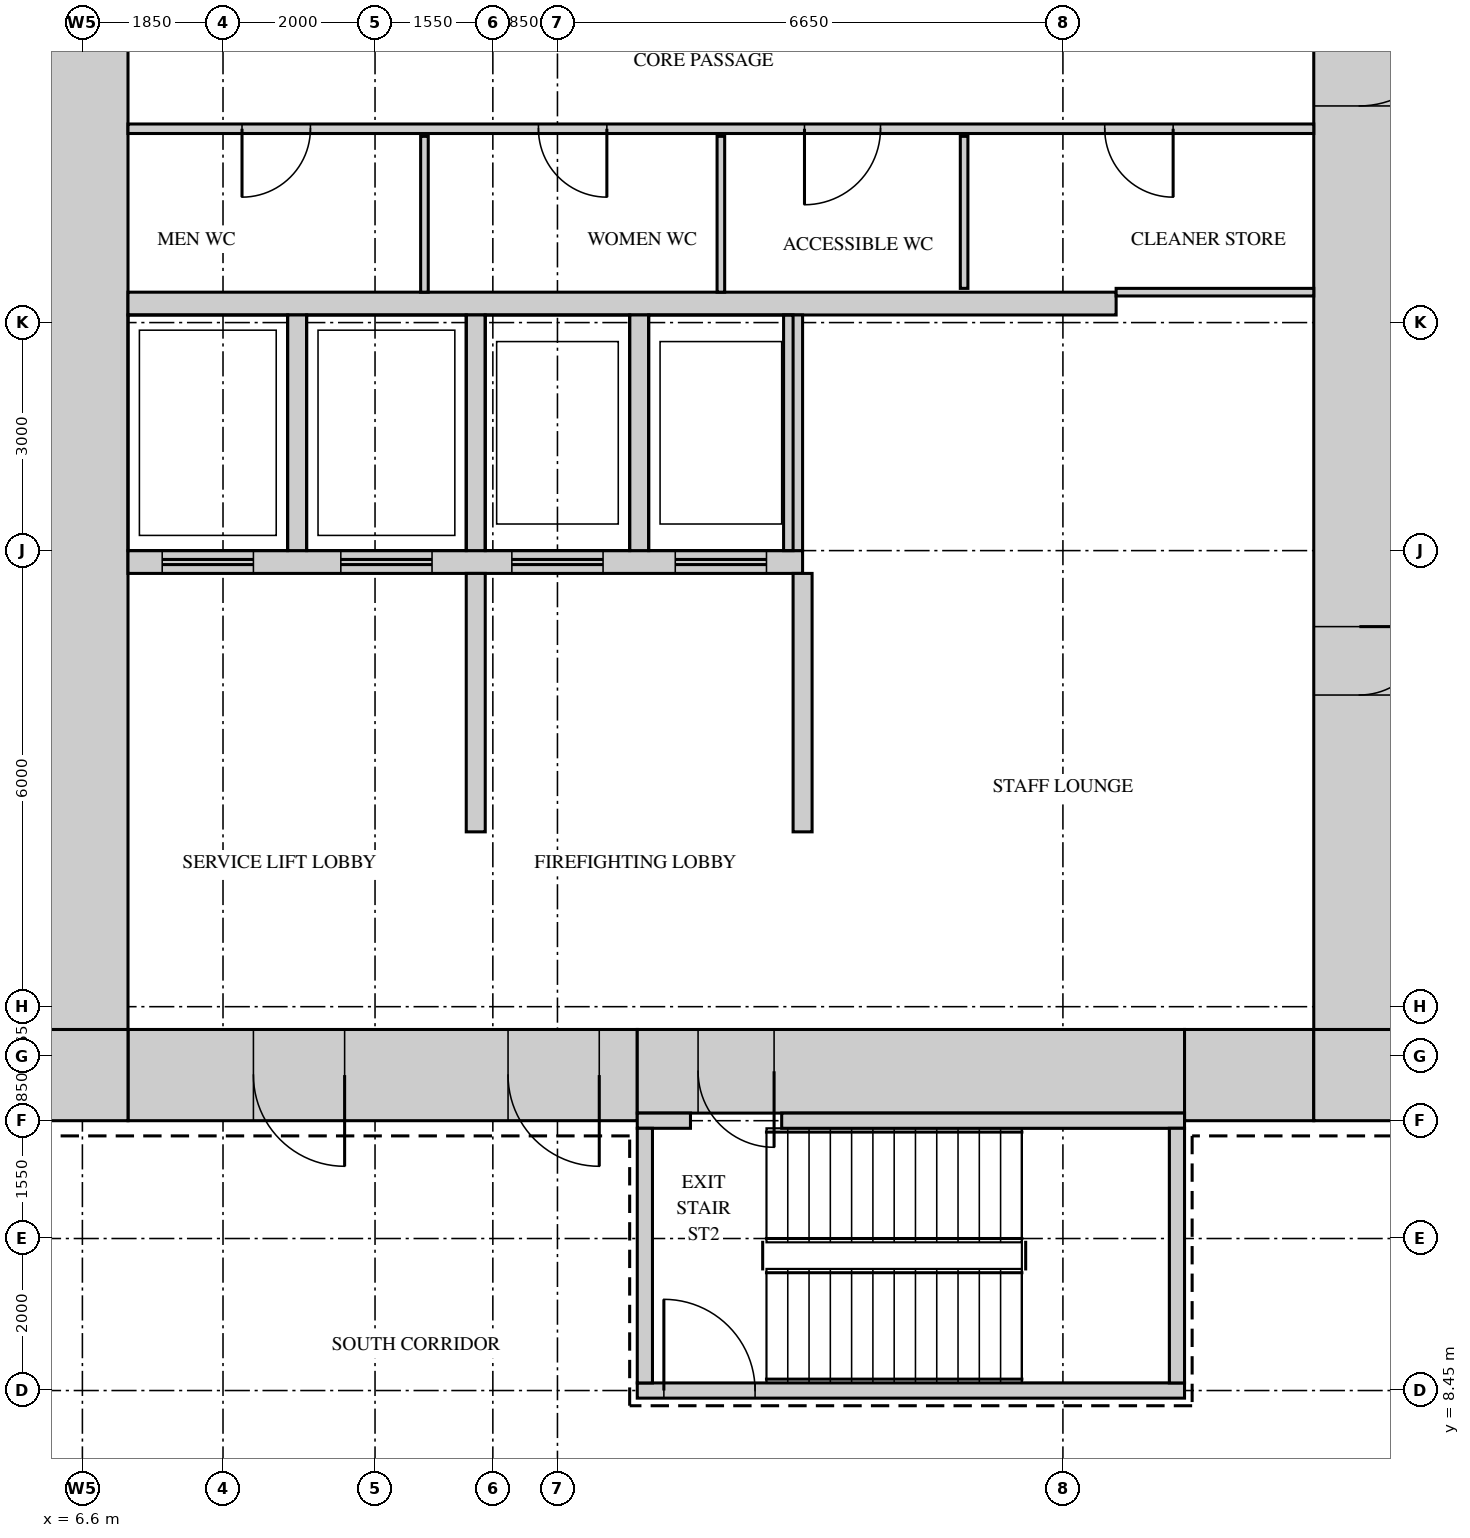
"""IFC4 building model, lengths in metres.
Left out: names, types, materials, properties, quantities, classifications, styles, units other than length and angle.
Written with IfcOpenShell. Run it as: python <this file> out.ifc"""

import sys

from ifc_helpers import new_model, si_unit, direction, frame, frame_2d, origin, place, context, subcontext, project, spatial, rectangle, extrude, source, transform, mapped, element, fill, save


model = new_model("IFC4")
c1 = context("Model", 3, precision=1e-05, world=origin(), true_north=direction((0.0, 1.0)))
c2 = subcontext(c1, "Body", "Model", "MODEL_VIEW")
j1 = project(units=[si_unit("LENGTHUNIT", "METRE"), si_unit("PLANEANGLEUNIT", "RADIAN")], contexts=[c1])
p1 = place(None, origin())
s1 = spatial("IfcSite", under=j1, at=p1, CompositionType="ELEMENT")
p2 = place(p1, origin())
s2 = spatial("IfcBuilding", under=s1, at=p2, CompositionType="ELEMENT")
p3 = place(p2, frame((0.0, 0.0, 69.0)))
s3 = spatial("IfcBuildingStorey", under=s2, at=p3, CompositionType="ELEMENT", Elevation=69.0)
m1 = source(origin(), c2, "Body", "SweptSolid", [
    extrude(rectangle(XDim=6.7, YDim=1.2, at=frame_2d((3.35, 0.0))), origin(), (0.0, 0.0, 1.0), 4.2),
])
p4 = place(p3, frame((7.2, 12.6, 0.0), z_axis=(0.0, 0.0, 1.0), x_axis=(1.0, 0.0, 0.0)))
e1 = element("IfcWall", 1, at=p4, inside=s3, PredefinedType="SHEAR", context=c2, shape_type="MappedRepresentation", body=[
    mapped(m1, transform((0.0, 0.0, 0.0))),
])
m2 = source(origin(), c2, "Body", "SweptSolid", [
    extrude(rectangle(XDim=1.2, YDim=2.1, at=frame_2d((0.6, 1.05))), frame((0.0, 0.61, 0.0), z_axis=(0.0, -1.0, 0.0), x_axis=(1.0, 0.0, 0.0)), (0.0, 0.0, 1.0), 1.22),
])
p5 = place(p4, frame((5.0, 0.0, 0.0)))
e2 = element("IfcOpeningElement", 2, at=p5, cuts=e1, PredefinedType="OPENING", context=c2, shape_type="MappedRepresentation", body=[
    mapped(m2, transform((0.0, 0.0, 0.0))),
])
p6 = place(p4, frame((1.65, 0.0, 0.0)))
e3 = element("IfcOpeningElement", 3, at=p6, cuts=e1, PredefinedType="OPENING", context=c2, shape_type="MappedRepresentation", body=[
    mapped(m2, transform((0.0, 0.0, 0.0))),
])
m3 = source(origin(), c2, "Body", "SweptSolid", [
    extrude(rectangle(XDim=7.2, YDim=1.1, at=frame_2d((3.6, 0.0))), origin(), (0.0, 0.0, 1.0), 4.2),
])
p7 = place(p3, frame((13.9, 12.65, 0.0), z_axis=(0.0, 0.0, 1.0), x_axis=(1.0, 0.0, 0.0)))
e4 = element("IfcWall", 4, at=p7, inside=s3, PredefinedType="SHEAR", context=c2, shape_type="MappedRepresentation", body=[
    mapped(m3, transform((0.0, 0.0, 0.0))),
])
m4 = source(origin(), c2, "Body", "SweptSolid", [
    extrude(rectangle(XDim=1.0, YDim=2.1, at=frame_2d((0.5, 1.05))), frame((0.0, 0.56, 0.0), z_axis=(0.0, -1.0, 0.0), x_axis=(1.0, 0.0, 0.0)), (0.0, 0.0, 1.0), 1.12),
])
p8 = place(p7, frame((0.8, 0.0, 0.0)))
e5 = element("IfcOpeningElement", 5, at=p8, cuts=e4, PredefinedType="OPENING", context=c2, shape_type="MappedRepresentation", body=[
    mapped(m4, transform((0.0, 0.0, 0.0))),
])
m5 = source(origin(), c2, "Body", "SweptSolid", [
    extrude(rectangle(XDim=1.7, YDim=1.2, at=frame_2d((0.85, 0.0))), origin(), (0.0, 0.0, 1.0), 4.2),
])
p9 = place(p3, frame((21.1, 12.6, 0.0), z_axis=(0.0, 0.0, 1.0), x_axis=(1.0, 0.0, 0.0)))
e6 = element("IfcWall", 6, at=p9, inside=s3, PredefinedType="SHEAR", context=c2, shape_type="MappedRepresentation", body=[
    mapped(m5, transform((0.0, 0.0, 0.0))),
])
m6 = source(origin(), c2, "Body", "SweptSolid", [
    extrude(rectangle(XDim=1.2, YDim=1.2, at=frame_2d((0.6, 0.0))), origin(), (0.0, 0.0, 1.0), 4.2),
])
for number, where, z_axis, x_axis in (
    (7, (22.8, 12.6, 0.0), (0.0, 0.0, 1.0), (1.0, 0.0, 0.0)),
    (8, (6.0, 12.6, 0.0), (0.0, 0.0, 1.0), (1.0, 0.0, 0.0)),
):
    element("IfcWall", number, at=place(p3, frame(where, z_axis=z_axis, x_axis=x_axis)), inside=s3, PredefinedType="SHEAR", context=c2, shape_type="MappedRepresentation", body=[
        mapped(m6, transform((0.0, 0.0, 0.0))),
    ])
m7 = source(origin(), c2, "Body", "SweptSolid", [
    extrude(rectangle(XDim=27.6, YDim=1.2, at=frame_2d((13.8, 0.0))), origin(), (0.0, 0.0, 1.0), 4.2),
])
p10 = place(p3, frame((23.4, 13.2, 0.0), z_axis=(0.0, 0.0, 1.0), x_axis=(0.0, 1.0, 0.0)))
e9 = element("IfcWall", 9, at=p10, inside=s3, PredefinedType="SHEAR", context=c2, shape_type="MappedRepresentation", body=[
    mapped(m7, transform((0.0, 0.0, 0.0))),
])
m8 = source(origin(), c2, "Body", "SweptSolid", [
    extrude(rectangle(XDim=1.8, YDim=2.1, at=frame_2d((0.9, 1.05))), frame((0.0, 0.61, 0.0), z_axis=(0.0, -1.0, 0.0), x_axis=(1.0, 0.0, 0.0)), (0.0, 0.0, 1.0), 1.22),
])
p11 = place(p10, frame((22.4, 0.0, 0.0)))
e10 = element("IfcOpeningElement", 10, at=p11, cuts=e9, PredefinedType="OPENING", context=c2, shape_type="MappedRepresentation", body=[
    mapped(m8, transform((0.0, 0.0, 0.0))),
])
p12 = place(p10, frame((12.15, 0.0, 0.0)))
e11 = element("IfcOpeningElement", 11, at=p12, cuts=e9, PredefinedType="OPENING", context=c2, shape_type="MappedRepresentation", body=[
    mapped(m2, transform((0.0, 0.0, 0.0))),
])
m9 = source(origin(), c2, "Body", "SweptSolid", [
    extrude(rectangle(XDim=0.9, YDim=2.1, at=frame_2d((0.45, 1.05))), frame((0.0, 0.61, 0.0), z_axis=(0.0, -1.0, 0.0), x_axis=(1.0, 0.0, 0.0)), (0.0, 0.0, 1.0), 1.22),
])
p13 = place(p10, frame((4.4, 0.0, 0.0)))
e12 = element("IfcOpeningElement", 12, at=p13, cuts=e9, PredefinedType="OPENING", context=c2, shape_type="MappedRepresentation", body=[
    mapped(m9, transform((0.0, 0.0, 0.0))),
])
p14 = place(p3, frame((6.6, 13.2, 0.0), z_axis=(0.0, 0.0, 1.0), x_axis=(0.0, 1.0, 0.0)))
e13 = element("IfcWall", 13, at=p14, inside=s3, PredefinedType="SHEAR", context=c2, shape_type="MappedRepresentation", body=[
    mapped(m7, transform((0.0, 0.0, 0.0))),
])
m10 = source(origin(), c2, "Body", "SweptSolid", [
    extrude(rectangle(XDim=0.7, YDim=0.2, at=frame_2d((0.35, 0.0))), origin(), (0.0, 0.0, 1.0), 4.2),
])
p15 = place(p3, frame((13.9, 12.0, 0.0), z_axis=(0.0, 0.0, 1.0), x_axis=(1.0, 0.0, 0.0)))
e14 = element("IfcWall", 14, at=p15, inside=s3, PredefinedType="SHEAR", context=c2, shape_type="MappedRepresentation", body=[
    mapped(m10, transform((0.0, 0.0, 0.0))),
])
m11 = source(origin(), c2, "Body", "SweptSolid", [
    extrude(rectangle(XDim=5.3, YDim=0.2, at=frame_2d((2.65, 0.0))), origin(), (0.0, 0.0, 1.0), 4.2),
])
p16 = place(p3, frame((15.8, 12.0, 0.0), z_axis=(0.0, 0.0, 1.0), x_axis=(1.0, 0.0, 0.0)))
e15 = element("IfcWall", 15, at=p16, inside=s3, PredefinedType="SHEAR", context=c2, shape_type="MappedRepresentation", body=[
    mapped(m11, transform((0.0, 0.0, 0.0))),
])
m12 = source(origin(), c2, "Body", "SweptSolid", [
    extrude(rectangle(XDim=7.2, YDim=0.2, at=frame_2d((3.6, 0.0))), origin(), (0.0, 0.0, 1.0), 4.2),
])
p17 = place(p3, frame((13.9, 8.45, 0.0), z_axis=(0.0, 0.0, 1.0), x_axis=(1.0, 0.0, 0.0)))
e16 = element("IfcWall", 16, at=p17, inside=s3, PredefinedType="SHEAR", context=c2, shape_type="MappedRepresentation", body=[
    mapped(m12, transform((0.0, 0.0, 0.0))),
])
m13 = source(origin(), c2, "Body", "SweptSolid", [
    extrude(rectangle(XDim=1.2, YDim=2.1, at=frame_2d((0.6, 1.05))), frame((0.0, 0.11, 0.0), z_axis=(0.0, -1.0, 0.0), x_axis=(1.0, 0.0, 0.0)), (0.0, 0.0, 1.0), 0.22),
])
p18 = place(p17, frame((0.35, 0.0, 0.0)))
e17 = element("IfcOpeningElement", 17, at=p18, cuts=e16, PredefinedType="OPENING", context=c2, shape_type="MappedRepresentation", body=[
    mapped(m13, transform((0.0, 0.0, 0.0))),
])
m14 = source(origin(), c2, "Body", "SweptSolid", [
    extrude(rectangle(XDim=3.35, YDim=0.2, at=frame_2d((1.675, 0.0))), origin(), (0.0, 0.0, 1.0), 4.2),
])
for number, where, z_axis, x_axis in (
    (18, (21.0, 8.55, 0.0), (0.0, 0.0, 1.0), (0.0, 1.0, 0.0)),
    (19, (14.0, 8.55, 0.0), (0.0, 0.0, 1.0), (0.0, 1.0, 0.0)),
):
    element("IfcWall", number, at=place(p3, frame(where, z_axis=z_axis, x_axis=x_axis)), inside=s3, PredefinedType="SHEAR", context=c2, shape_type="MappedRepresentation", body=[
        mapped(m14, transform((0.0, 0.0, 0.0))),
    ])
m15 = source(origin(), c2, "Body", "SweptSolid", [
    extrude(rectangle(XDim=13.0, YDim=0.3, at=frame_2d((6.5, 0.0))), origin(), (0.0, 0.0, 1.0), 4.2),
])
p19 = place(p3, frame((7.2, 22.75, 0.0), z_axis=(0.0, 0.0, 1.0), x_axis=(1.0, 0.0, 0.0)))
e20 = element("IfcWall", 20, at=p19, inside=s3, PredefinedType="STANDARD", context=c2, shape_type="MappedRepresentation", body=[
    mapped(m15, transform((0.0, 0.0, 0.0))),
])
m16 = source(origin(), c2, "Body", "SweptSolid", [
    extrude(rectangle(XDim=8.875, YDim=0.3, at=frame_2d((4.438, 0.0))), origin(), (0.0, 0.0, 1.0), 4.2),
])
p20 = place(p3, frame((7.2, 19.35, 0.0), z_axis=(0.0, 0.0, 1.0), x_axis=(1.0, 0.0, 0.0)))
e21 = element("IfcWall", 21, at=p20, inside=s3, PredefinedType="STANDARD", context=c2, shape_type="MappedRepresentation", body=[
    mapped(m16, transform((0.0, 0.0, 0.0))),
])
m17 = source(origin(), c2, "Body", "SweptSolid", [
    extrude(rectangle(XDim=1.2, YDim=2.1, at=frame_2d((0.6, 1.05))), frame((0.0, 0.16, 0.0), z_axis=(0.0, -1.0, 0.0), x_axis=(1.0, 0.0, 0.0)), (0.0, 0.0, 1.0), 0.32),
])
p21 = place(p20, frame((0.45, 0.0, 0.0)))
e22 = element("IfcOpeningElement", 22, at=p21, cuts=e21, PredefinedType="OPENING", context=c2, shape_type="MappedRepresentation", body=[
    mapped(m17, transform((0.0, 0.0, 0.0))),
])
p22 = place(p20, frame((2.8, 0.0, 0.0)))
e23 = element("IfcOpeningElement", 23, at=p22, cuts=e21, PredefinedType="OPENING", context=c2, shape_type="MappedRepresentation", body=[
    mapped(m17, transform((0.0, 0.0, 0.0))),
])
p23 = place(p20, frame((5.05, 0.0, 0.0)))
e24 = element("IfcOpeningElement", 24, at=p23, cuts=e21, PredefinedType="OPENING", context=c2, shape_type="MappedRepresentation", body=[
    mapped(m17, transform((0.0, 0.0, 0.0))),
])
p24 = place(p20, frame((7.2, 0.0, 0.0)))
e25 = element("IfcOpeningElement", 25, at=p24, cuts=e21, PredefinedType="OPENING", context=c2, shape_type="MappedRepresentation", body=[
    mapped(m17, transform((0.0, 0.0, 0.0))),
])
m18 = source(origin(), c2, "Body", "SweptSolid", [
    extrude(rectangle(XDim=3.1, YDim=0.25, at=frame_2d((1.55, 0.0))), origin(), (0.0, 0.0, 1.0), 4.2),
])
for number, where, z_axis, x_axis in (
    (26, (9.425, 19.5, 0.0), (0.0, 0.0, 1.0), (0.0, 1.0, 0.0)),
    (27, (11.775, 19.5, 0.0), (0.0, 0.0, 1.0), (0.0, 1.0, 0.0)),
    (28, (13.925, 19.5, 0.0), (0.0, 0.0, 1.0), (0.0, 1.0, 0.0)),
    (29, (15.95, 19.5, 0.0), (0.0, 0.0, 1.0), (0.0, 1.0, 0.0)),
):
    element("IfcWall", number, at=place(p3, frame(where, z_axis=z_axis, x_axis=x_axis)), inside=s3, PredefinedType="STANDARD", context=c2, shape_type="MappedRepresentation", body=[
        mapped(m18, transform((0.0, 0.0, 0.0))),
    ])
m19 = source(origin(), c2, "Body", "SweptSolid", [
    extrude(rectangle(XDim=3.4, YDim=0.25, at=frame_2d((1.7, 0.0))), origin(), (0.0, 0.0, 1.0), 4.2),
])
for number, where, z_axis, x_axis in (
    (30, (16.075, 15.8, 0.0), (0.0, 0.0, 1.0), (0.0, 1.0, 0.0)),
    (31, (11.775, 15.8, 0.0), (0.0, 0.0, 1.0), (0.0, 1.0, 0.0)),
):
    element("IfcWall", number, at=place(p3, frame(where, z_axis=z_axis, x_axis=x_axis)), inside=s3, PredefinedType="STANDARD", context=c2, shape_type="MappedRepresentation", body=[
        mapped(m19, transform((0.0, 0.0, 0.0))),
    ])
m20 = source(origin(), c2, "Body", "SweptSolid", [
    extrude(rectangle(XDim=2.05, YDim=0.1, at=frame_2d((1.025, 0.0))), origin(), (0.0, 0.0, 1.0), 4.3),
])
for number, where, z_axis, x_axis in (
    (32, (11.1, 22.9, 0.0), (0.0, 0.0, 1.0), (0.0, 1.0, 0.0)),
    (33, (15.0, 22.9, 0.0), (0.0, 0.0, 1.0), (0.0, 1.0, 0.0)),
):
    element("IfcWall", number, at=place(p3, frame(where, z_axis=z_axis, x_axis=x_axis)), inside=s3, PredefinedType="PARTITIONING", context=c2, shape_type="MappedRepresentation", body=[
        mapped(m20, transform((0.0, 0.0, 0.0))),
    ])
m21 = source(origin(), c2, "Body", "SweptSolid", [
    extrude(rectangle(XDim=2.6, YDim=0.1, at=frame_2d((1.3, 0.0))), origin(), (0.0, 0.0, 1.0), 4.3),
])
p25 = place(p3, frame((20.2, 22.9, 0.0), z_axis=(0.0, 0.0, 1.0), x_axis=(1.0, 0.0, 0.0)))
e34 = element("IfcWall", 34, at=p25, inside=s3, PredefinedType="PARTITIONING", context=c2, shape_type="MappedRepresentation", body=[
    mapped(m21, transform((0.0, 0.0, 0.0))),
])
m22 = source(origin(), c2, "Body", "SweptSolid", [
    extrude(rectangle(XDim=2.0, YDim=0.1, at=frame_2d((1.0, 0.0))), origin(), (0.0, 0.0, 1.0), 4.3),
])
p26 = place(p3, frame((18.2, 22.95, 0.0), z_axis=(0.0, 0.0, 1.0), x_axis=(0.0, 1.0, 0.0)))
e35 = element("IfcWall", 35, at=p26, inside=s3, PredefinedType="PARTITIONING", context=c2, shape_type="MappedRepresentation", body=[
    mapped(m22, transform((0.0, 0.0, 0.0))),
])
m23 = source(origin(), c2, "Body", "SweptSolid", [
    extrude(rectangle(XDim=15.6, YDim=0.125, at=frame_2d((7.8, 0.0))), origin(), (0.0, 0.0, 1.0), 4.3),
])
p27 = place(p3, frame((7.2, 25.05, 0.0), z_axis=(0.0, 0.0, 1.0), x_axis=(1.0, 0.0, 0.0)))
e36 = element("IfcWall", 36, at=p27, inside=s3, PredefinedType="PARTITIONING", context=c2, shape_type="MappedRepresentation", body=[
    mapped(m23, transform((0.0, 0.0, 0.0))),
])
m24 = source(origin(), c2, "Body", "SweptSolid", [
    extrude(rectangle(XDim=0.9, YDim=2.1, at=frame_2d((0.45, 1.05))), frame((0.0, 0.073, 0.0), z_axis=(0.0, -1.0, 0.0), x_axis=(1.0, 0.0, 0.0)), (0.0, 0.0, 1.0), 0.145),
])
p28 = place(p27, frame((1.5, 0.0, 0.0)))
e37 = element("IfcOpeningElement", 37, at=p28, cuts=e36, PredefinedType="OPENING", context=c2, shape_type="MappedRepresentation", body=[
    mapped(m24, transform((0.0, 0.0, 0.0))),
])
p29 = place(p27, frame((5.4, 0.0, 0.0)))
e38 = element("IfcOpeningElement", 38, at=p29, cuts=e36, PredefinedType="OPENING", context=c2, shape_type="MappedRepresentation", body=[
    mapped(m24, transform((0.0, 0.0, 0.0))),
])
m25 = source(origin(), c2, "Body", "SweptSolid", [
    extrude(rectangle(XDim=1.0, YDim=2.1, at=frame_2d((0.5, 1.05))), frame((0.0, 0.073, 0.0), z_axis=(0.0, -1.0, 0.0), x_axis=(1.0, 0.0, 0.0)), (0.0, 0.0, 1.0), 0.145),
])
p30 = place(p27, frame((8.9, 0.0, 0.0)))
e39 = element("IfcOpeningElement", 39, at=p30, cuts=e36, PredefinedType="OPENING", context=c2, shape_type="MappedRepresentation", body=[
    mapped(m25, transform((0.0, 0.0, 0.0))),
])
p31 = place(p27, frame((12.85, 0.0, 0.0)))
e40 = element("IfcOpeningElement", 40, at=p31, cuts=e36, PredefinedType="OPENING", context=c2, shape_type="MappedRepresentation", body=[
    mapped(m24, transform((0.0, 0.0, 0.0))),
])
m26 = source(origin(), c2, "Body", "SweptSolid", [
    extrude(rectangle(XDim=1.2, YDim=2.1, at=frame_2d((0.6, 1.05))), frame((0.0, 0.55, 0.0), z_axis=(0.0, -1.0, 0.0), x_axis=(1.0, 0.0, 0.0)), (0.0, 0.0, 1.0), 1.1),
])
p32 = place(p12, origin())
e41 = element("IfcDoor", 41, at=p32, inside=s3, OperationType="SINGLE_SWING_RIGHT", PredefinedType="DOOR", context=c2, shape_type="MappedRepresentation", body=[
    mapped(m26, transform((0.0, 0.0, 0.0))),
])
fill(e11, e41)
m27 = source(origin(), c2, "Body", "SweptSolid", [
    extrude(rectangle(XDim=0.9, YDim=2.1, at=frame_2d((0.45, 1.05))), frame((0.0, 0.025, 0.0), z_axis=(0.0, -1.0, 0.0), x_axis=(1.0, 0.0, 0.0)), (0.0, 0.0, 1.0), 0.05),
])
p33 = place(p28, origin())
e42 = element("IfcDoor", 42, at=p33, inside=s3, OperationType="SINGLE_SWING_LEFT", PredefinedType="DOOR", context=c2, shape_type="MappedRepresentation", body=[
    mapped(m27, transform((0.0, 0.0, 0.0))),
])
fill(e37, e42)
p34 = place(p29, origin())
e43 = element("IfcDoor", 43, at=p34, inside=s3, OperationType="SINGLE_SWING_RIGHT", PredefinedType="DOOR", context=c2, shape_type="MappedRepresentation", body=[
    mapped(m27, transform((0.0, 0.0, 0.0))),
])
fill(e38, e43)
m28 = source(origin(), c2, "Body", "SweptSolid", [
    extrude(rectangle(XDim=1.0, YDim=2.1, at=frame_2d((0.5, 1.05))), frame((0.0, 0.025, 0.0), z_axis=(0.0, -1.0, 0.0), x_axis=(1.0, 0.0, 0.0)), (0.0, 0.0, 1.0), 0.05),
])
p35 = place(p30, origin())
e44 = element("IfcDoor", 44, at=p35, inside=s3, OperationType="SINGLE_SWING_LEFT", PredefinedType="DOOR", context=c2, shape_type="MappedRepresentation", body=[
    mapped(m28, transform((0.0, 0.0, 0.0))),
])
fill(e39, e44)
p36 = place(p31, origin())
e45 = element("IfcDoor", 45, at=p36, inside=s3, OperationType="SINGLE_SWING_RIGHT", PredefinedType="DOOR", context=c2, shape_type="MappedRepresentation", body=[
    mapped(m27, transform((0.0, 0.0, 0.0))),
])
fill(e40, e45)
m29 = source(origin(), c2, "Body", "SweptSolid", [
    extrude(rectangle(XDim=0.9, YDim=2.1, at=frame_2d((0.45, 1.05))), frame((0.0, 0.55, 0.0), z_axis=(0.0, -1.0, 0.0), x_axis=(1.0, 0.0, 0.0)), (0.0, 0.0, 1.0), 1.1),
])
p37 = place(p13, origin())
e46 = element("IfcDoor", 46, at=p37, inside=s3, OperationType="SINGLE_SWING_RIGHT", PredefinedType="DOOR", context=c2, shape_type="MappedRepresentation", body=[
    mapped(m29, transform((0.0, 0.0, 0.0))),
])
fill(e12, e46)
p38 = place(p5, origin())
e47 = element("IfcDoor", 47, at=p38, inside=s3, OperationType="SINGLE_SWING_RIGHT", PredefinedType="DOOR", context=c2, shape_type="MappedRepresentation", body=[
    mapped(m26, transform((0.0, 0.0, 0.0))),
])
fill(e2, e47)
p39 = place(p6, origin())
e48 = element("IfcDoor", 48, at=p39, inside=s3, OperationType="SINGLE_SWING_RIGHT", PredefinedType="DOOR", context=c2, shape_type="MappedRepresentation", body=[
    mapped(m26, transform((0.0, 0.0, 0.0))),
])
fill(e3, e48)
m30 = source(origin(), c2, "Body", "SweptSolid", [
    extrude(rectangle(XDim=1.0, YDim=2.1, at=frame_2d((0.5, 1.05))), frame((0.0, 0.5, 0.0), z_axis=(0.0, -1.0, 0.0), x_axis=(1.0, 0.0, 0.0)), (0.0, 0.0, 1.0), 1.0),
])
p40 = place(p8, origin())
e49 = element("IfcDoor", 49, at=p40, inside=s3, OperationType="SINGLE_SWING_RIGHT", PredefinedType="DOOR", context=c2, shape_type="MappedRepresentation", body=[
    mapped(m30, transform((0.0, 0.0, 0.0))),
])
fill(e5, e49)
m31 = source(origin(), c2, "Body", "SweptSolid", [
    extrude(rectangle(XDim=1.2, YDim=2.1, at=frame_2d((0.6, 1.05))), frame((0.0, 0.025, 0.0), z_axis=(0.0, -1.0, 0.0), x_axis=(1.0, 0.0, 0.0)), (0.0, 0.0, 1.0), 0.05),
])
p41 = place(p18, origin())
e50 = element("IfcDoor", 50, at=p41, inside=s3, OperationType="SINGLE_SWING_RIGHT", PredefinedType="DOOR", context=c2, shape_type="MappedRepresentation", body=[
    mapped(m31, transform((0.0, 0.0, 0.0))),
])
fill(e17, e50)
p42 = place(p21, origin())
e51 = element("IfcDoor", 51, at=p42, inside=s3, OperationType="DOUBLE_DOOR_SLIDING", PredefinedType="DOOR", context=c2, shape_type="MappedRepresentation", body=[
    mapped(m31, transform((0.0, 0.0, 0.0))),
])
fill(e22, e51)
p43 = place(p22, origin())
e52 = element("IfcDoor", 52, at=p43, inside=s3, OperationType="DOUBLE_DOOR_SLIDING", PredefinedType="DOOR", context=c2, shape_type="MappedRepresentation", body=[
    mapped(m31, transform((0.0, 0.0, 0.0))),
])
fill(e23, e52)
p44 = place(p23, origin())
e53 = element("IfcDoor", 53, at=p44, inside=s3, OperationType="DOUBLE_DOOR_SLIDING", PredefinedType="DOOR", context=c2, shape_type="MappedRepresentation", body=[
    mapped(m31, transform((0.0, 0.0, 0.0))),
])
fill(e24, e53)
p45 = place(p24, origin())
e54 = element("IfcDoor", 54, at=p45, inside=s3, OperationType="DOUBLE_DOOR_SLIDING", PredefinedType="DOOR", context=c2, shape_type="MappedRepresentation", body=[
    mapped(m31, transform((0.0, 0.0, 0.0))),
])
fill(e25, e54)
save(model, sys.argv[1])
